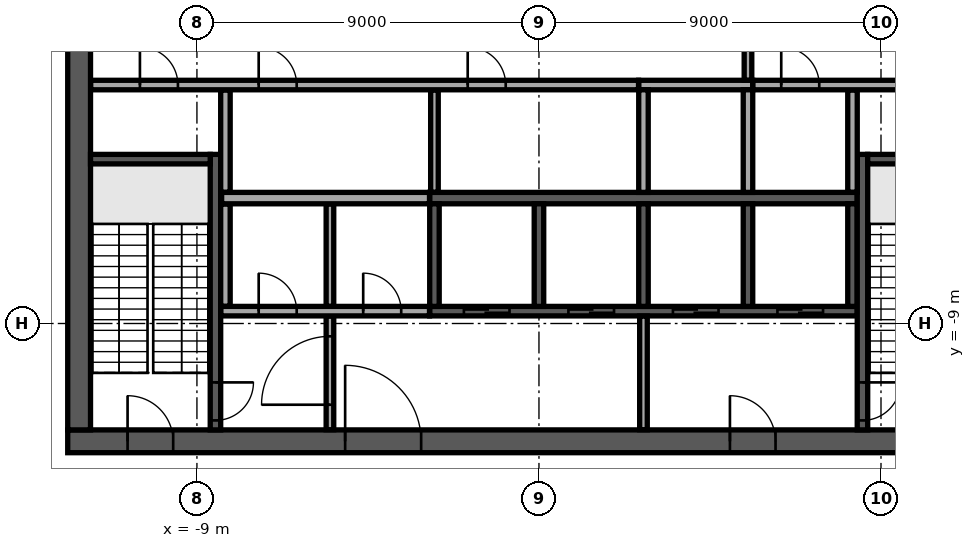
"""IFC4 building model, lengths in metres.
Left out: names, types, materials, properties, quantities, classifications, styles, units other than length and angle.
Written with IfcOpenShell. Run it as: python <this file> out.ifc"""

import sys

from ifc_helpers import new_model, si_unit, direction, frame, frame_2d, origin, place, context, subcontext, project, spatial, rectangle, extrude, element, fill, save


model = new_model("IFC4")
c1 = context("Model", 3, precision=1e-05, world=origin(), true_north=direction((0.0, 1.0)))
c2 = subcontext(c1, "Body", "Model", "MODEL_VIEW")
j1 = project(units=[si_unit("LENGTHUNIT", "METRE"), si_unit("PLANEANGLEUNIT", "RADIAN")], contexts=[c1])
p1 = place(None, origin())
s1 = spatial("IfcSite", under=j1, at=p1, CompositionType="ELEMENT")
p2 = place(p1, origin())
s2 = spatial("IfcBuilding", under=s1, at=p2, CompositionType="ELEMENT")
p3 = place(p2, frame((0.0, 0.0, 344.5)))
s3 = spatial("IfcBuildingStorey", under=s2, at=p3, CompositionType="ELEMENT", Elevation=344.5)
p4 = place(p3, frame((-12.4, -12.1, 0.0), z_axis=(0.0, 0.0, 1.0), x_axis=(1.0, 0.0, 0.0)))
e1 = element("IfcWall", 1, at=p4, inside=s3, PredefinedType="SHEAR", context=c2, shape_type="SweptSolid", body=[
    extrude(rectangle(XDim=24.8, YDim=0.6, at=frame_2d((12.4, 0.0))), origin(), (0.0, 0.0, 1.0), 5.3),
])
p5 = place(p4, frame((7.3, 0.0, 0.0)))
e2 = element("IfcOpeningElement", 2, at=p5, cuts=e1, PredefinedType="OPENING", context=c2, shape_type="SweptSolid", body=[
    extrude(rectangle(XDim=2.0, YDim=2.1, at=frame_2d((1.0, 1.05))), frame((0.0, 0.31, 0.0), z_axis=(0.0, -1.0, 0.0), x_axis=(1.0, 0.0, 0.0)), (0.0, 0.0, 1.0), 0.62),
])
p6 = place(p4, frame((17.425, 0.0, 0.0)))
e3 = element("IfcOpeningElement", 3, at=p6, cuts=e1, PredefinedType="OPENING", context=c2, shape_type="SweptSolid", body=[
    extrude(rectangle(XDim=1.2, YDim=2.1, at=frame_2d((0.6, 1.05))), frame((0.0, 0.31, 0.0), z_axis=(0.0, -1.0, 0.0), x_axis=(1.0, 0.0, 0.0)), (0.0, 0.0, 1.0), 0.62),
])
p7 = place(p4, frame((1.575, 0.0, 0.0)))
e4 = element("IfcOpeningElement", 4, at=p7, cuts=e1, PredefinedType="OPENING", context=c2, shape_type="SweptSolid", body=[
    extrude(rectangle(XDim=1.2, YDim=2.1, at=frame_2d((0.6, 1.05))), frame((0.0, 0.31, 0.0), z_axis=(0.0, -1.0, 0.0), x_axis=(1.0, 0.0, 0.0)), (0.0, 0.0, 1.0), 0.62),
])
p8 = place(p4, frame((22.025, 0.0, 0.0)))
e5 = element("IfcOpeningElement", 5, at=p8, cuts=e1, PredefinedType="OPENING", context=c2, shape_type="SweptSolid", body=[
    extrude(rectangle(XDim=1.2, YDim=2.1, at=frame_2d((0.6, 1.05))), frame((0.0, 0.31, 0.0), z_axis=(0.0, -1.0, 0.0), x_axis=(1.0, 0.0, 0.0)), (0.0, 0.0, 1.0), 0.62),
])
p9 = place(p3, frame((-12.1, -11.8, 0.0), z_axis=(0.0, 0.0, 1.0), x_axis=(0.0, 1.0, 0.0)))
e6 = element("IfcWall", 6, at=p9, inside=s3, PredefinedType="SHEAR", context=c2, shape_type="SweptSolid", body=[
    extrude(rectangle(XDim=23.6, YDim=0.6, at=frame_2d((11.8, 0.0))), origin(), (0.0, 0.0, 1.0), 5.3),
])
p10 = place(p9, frame((10.6, 0.0, 0.0)))
e7 = element("IfcOpeningElement", 7, at=p10, cuts=e6, PredefinedType="OPENING", context=c2, shape_type="SweptSolid", body=[
    extrude(rectangle(XDim=2.4, YDim=2.4, at=frame_2d((1.2, 1.2))), frame((0.0, 0.31, 0.0), z_axis=(0.0, -1.0, 0.0), x_axis=(1.0, 0.0, 0.0)), (0.0, 0.0, 1.0), 0.62),
])
p11 = place(p3, frame((-2.875, -5.7, 0.0), z_axis=(0.0, 0.0, 1.0), x_axis=(1.0, 0.0, 0.0)))
e8 = element("IfcWall", 8, at=p11, inside=s3, PredefinedType="SOLIDWALL", context=c2, shape_type="SweptSolid", body=[
    extrude(rectangle(XDim=11.25, YDim=0.3, at=frame_2d((5.625, 0.0))), origin(), (0.0, 0.0, 1.0), 5.3),
])
p12 = place(p3, frame((2.625, -2.725, 0.0), z_axis=(0.0, 0.0, 1.0), x_axis=(1.0, 0.0, 0.0)))
e9 = element("IfcWall", 9, at=p12, inside=s3, PredefinedType="SOLIDWALL", context=c2, shape_type="SweptSolid", body=[
    extrude(rectangle(XDim=3.0, YDim=0.25, at=frame_2d((1.5, 0.0))), origin(), (0.0, 0.0, 1.0), 5.3),
])
for number, where, z_axis, x_axis in (
    (10, (2.75, -5.55, 0.0), (0.0, 0.0, 1.0), (0.0, 1.0, 0.0)),
    (11, (5.5, -5.55, 0.0), (0.0, 0.0, 1.0), (0.0, 1.0, 0.0)),
):
    element("IfcWall", number, at=place(p3, frame(where, z_axis=z_axis, x_axis=x_axis)), inside=s3, PredefinedType="SOLIDWALL", context=c2, shape_type="SweptSolid", body=[
        extrude(rectangle(XDim=2.7, YDim=0.25, at=frame_2d((1.35, 0.0))), origin(), (0.0, 0.0, 1.0), 5.3),
    ])
p13 = place(p3, frame((-2.875, -8.675, 0.0), z_axis=(0.0, 0.0, 1.0), x_axis=(1.0, 0.0, 0.0)))
e12 = element("IfcWall", 12, at=p13, inside=s3, PredefinedType="SOLIDWALL", context=c2, shape_type="SweptSolid", body=[
    extrude(rectangle(XDim=11.25, YDim=0.25, at=frame_2d((5.625, 0.0))), origin(), (0.0, 0.0, 1.0), 5.3),
])
p14 = place(p13, frame((0.9, 0.0, 0.0)))
e13 = element("IfcOpeningElement", 13, at=p14, cuts=e12, PredefinedType="OPENING", context=c2, shape_type="SweptSolid", body=[
    extrude(rectangle(XDim=1.2, YDim=2.1, at=frame_2d((0.6, 1.05))), frame((0.0, 0.135, 0.0), z_axis=(0.0, -1.0, 0.0), x_axis=(1.0, 0.0, 0.0)), (0.0, 0.0, 1.0), 0.27),
])
p15 = place(p13, frame((3.65, 0.0, 0.0)))
e14 = element("IfcOpeningElement", 14, at=p15, cuts=e12, PredefinedType="OPENING", context=c2, shape_type="SweptSolid", body=[
    extrude(rectangle(XDim=1.2, YDim=2.1, at=frame_2d((0.6, 1.05))), frame((0.0, 0.135, 0.0), z_axis=(0.0, -1.0, 0.0), x_axis=(1.0, 0.0, 0.0)), (0.0, 0.0, 1.0), 0.27),
])
p16 = place(p13, frame((6.4, 0.0, 0.0)))
e15 = element("IfcOpeningElement", 15, at=p16, cuts=e12, PredefinedType="OPENING", context=c2, shape_type="SweptSolid", body=[
    extrude(rectangle(XDim=1.2, YDim=2.1, at=frame_2d((0.6, 1.05))), frame((0.0, 0.135, 0.0), z_axis=(0.0, -1.0, 0.0), x_axis=(1.0, 0.0, 0.0)), (0.0, 0.0, 1.0), 0.27),
])
p17 = place(p13, frame((9.15, 0.0, 0.0)))
e16 = element("IfcOpeningElement", 16, at=p17, cuts=e12, PredefinedType="OPENING", context=c2, shape_type="SweptSolid", body=[
    extrude(rectangle(XDim=1.2, YDim=2.1, at=frame_2d((0.6, 1.05))), frame((0.0, 0.135, 0.0), z_axis=(0.0, -1.0, 0.0), x_axis=(1.0, 0.0, 0.0)), (0.0, 0.0, 1.0), 0.27),
])
for number, where, z_axis, x_axis in (
    (17, (-2.75, -8.55, 0.0), (0.0, 0.0, 1.0), (0.0, 1.0, 0.0)),
    (18, (0.0, -8.55, 0.0), (0.0, 0.0, 1.0), (0.0, 1.0, 0.0)),
    (19, (2.75, -8.55, 0.0), (0.0, 0.0, 1.0), (0.0, 1.0, 0.0)),
    (20, (5.5, -8.55, 0.0), (0.0, 0.0, 1.0), (0.0, 1.0, 0.0)),
    (21, (8.25, -8.55, 0.0), (0.0, 0.0, 1.0), (0.0, 1.0, 0.0)),
):
    element("IfcWall", number, at=place(p3, frame(where, z_axis=z_axis, x_axis=x_axis)), inside=s3, PredefinedType="SOLIDWALL", context=c2, shape_type="SweptSolid", body=[
        extrude(rectangle(XDim=2.7, YDim=0.25, at=frame_2d((1.35, 0.0))), origin(), (0.0, 0.0, 1.0), 5.3),
    ])
p18 = place(p3, frame((-8.512, -4.55, 0.0), z_axis=(0.0, 0.0, 1.0), x_axis=(0.0, -1.0, 0.0)))
e22 = element("IfcWall", 22, at=p18, inside=s3, PredefinedType="SOLIDWALL", context=c2, shape_type="SweptSolid", body=[
    extrude(rectangle(XDim=7.25, YDim=0.275, at=frame_2d((3.625, 0.0))), origin(), (0.0, 0.0, 1.0), 5.3),
])
p19 = place(p18, frame((6.0, 0.0, 0.0)))
e23 = element("IfcOpeningElement", 23, at=p19, cuts=e22, PredefinedType="OPENING", context=c2, shape_type="SweptSolid", body=[
    extrude(rectangle(XDim=1.0, YDim=2.1, at=frame_2d((0.5, 1.05))), frame((0.0, 0.147, 0.0), z_axis=(0.0, -1.0, 0.0), x_axis=(1.0, 0.0, 0.0)), (0.0, 0.0, 1.0), 0.295),
])
p20 = place(p3, frame((-8.65, -4.675, 0.0), z_axis=(0.0, 0.0, 1.0), x_axis=(-1.0, 0.0, 0.0)))
e24 = element("IfcWall", 24, at=p20, inside=s3, PredefinedType="SOLIDWALL", context=c2, shape_type="SweptSolid", body=[
    extrude(rectangle(XDim=3.15, YDim=0.25, at=frame_2d((1.575, 0.0))), origin(), (0.0, 0.0, 1.0), 5.3),
])
p21 = place(p3, frame((8.512, -4.55, 0.0), z_axis=(0.0, 0.0, 1.0), x_axis=(0.0, -1.0, 0.0)))
e25 = element("IfcWall", 25, at=p21, inside=s3, PredefinedType="SOLIDWALL", context=c2, shape_type="SweptSolid", body=[
    extrude(rectangle(XDim=7.25, YDim=0.275, at=frame_2d((3.625, 0.0))), origin(), (0.0, 0.0, 1.0), 5.3),
])
p22 = place(p21, frame((6.0, 0.0, 0.0)))
e26 = element("IfcOpeningElement", 26, at=p22, cuts=e25, PredefinedType="OPENING", context=c2, shape_type="SweptSolid", body=[
    extrude(rectangle(XDim=1.0, YDim=2.1, at=frame_2d((0.5, 1.05))), frame((0.0, 0.147, 0.0), z_axis=(0.0, -1.0, 0.0), x_axis=(1.0, 0.0, 0.0)), (0.0, 0.0, 1.0), 0.295),
])
p23 = place(p3, frame((8.65, -4.675, 0.0), z_axis=(0.0, 0.0, 1.0), x_axis=(1.0, 0.0, 0.0)))
e27 = element("IfcWall", 27, at=p23, inside=s3, PredefinedType="SOLIDWALL", context=c2, shape_type="SweptSolid", body=[
    extrude(rectangle(XDim=3.15, YDim=0.25, at=frame_2d((1.575, 0.0))), origin(), (0.0, 0.0, 1.0), 5.3),
])
p24 = place(p3, frame((-5.5, -11.795, 0.0), z_axis=(0.0, 0.0, 1.0), x_axis=(0.0, 1.0, 0.0)))
e28 = element("IfcWall", 28, at=p24, inside=s3, PredefinedType="PARTITIONING", context=c2, shape_type="SweptSolid", body=[
    extrude(rectangle(XDim=2.99, YDim=0.2, at=frame_2d((1.495, 0.0))), origin(), (0.0, 0.0, 1.0), 5.3),
])
p25 = place(p24, frame((0.657, 0.0, 0.0)))
e29 = element("IfcOpeningElement", 29, at=p25, cuts=e28, PredefinedType="OPENING", context=c2, shape_type="SweptSolid", body=[
    extrude(rectangle(XDim=1.8, YDim=2.1, at=frame_2d((0.9, 1.05))), frame((0.0, 0.11, 0.0), z_axis=(0.0, -1.0, 0.0), x_axis=(1.0, 0.0, 0.0)), (0.0, 0.0, 1.0), 0.22),
])
p26 = place(p3, frame((2.75, -11.795, 0.0), z_axis=(0.0, 0.0, 1.0), x_axis=(0.0, 1.0, 0.0)))
e30 = element("IfcWall", 30, at=p26, inside=s3, PredefinedType="PARTITIONING", context=c2, shape_type="SweptSolid", body=[
    extrude(rectangle(XDim=2.99, YDim=0.2, at=frame_2d((1.495, 0.0))), origin(), (0.0, 0.0, 1.0), 5.3),
])
p27 = place(p3, frame((-8.37, -8.675, 0.0), z_axis=(0.0, 0.0, 1.0), x_axis=(1.0, 0.0, 0.0)))
e31 = element("IfcWall", 31, at=p27, inside=s3, PredefinedType="PARTITIONING", context=c2, shape_type="SweptSolid", body=[
    extrude(rectangle(XDim=5.49, YDim=0.25, at=frame_2d((2.745, 0.0))), origin(), (0.0, 0.0, 1.0), 5.3),
])
p28 = place(p27, frame((0.995, 0.0, 0.0)))
e32 = element("IfcOpeningElement", 32, at=p28, cuts=e31, PredefinedType="OPENING", context=c2, shape_type="SweptSolid", body=[
    extrude(rectangle(XDim=1.0, YDim=2.1, at=frame_2d((0.5, 1.05))), frame((0.0, 0.135, 0.0), z_axis=(0.0, -1.0, 0.0), x_axis=(1.0, 0.0, 0.0)), (0.0, 0.0, 1.0), 0.27),
])
p29 = place(p27, frame((3.745, 0.0, 0.0)))
e33 = element("IfcOpeningElement", 33, at=p29, cuts=e31, PredefinedType="OPENING", context=c2, shape_type="SweptSolid", body=[
    extrude(rectangle(XDim=1.0, YDim=2.1, at=frame_2d((0.5, 1.05))), frame((0.0, 0.135, 0.0), z_axis=(0.0, -1.0, 0.0), x_axis=(1.0, 0.0, 0.0)), (0.0, 0.0, 1.0), 0.27),
])
p30 = place(p3, frame((-8.25, -8.545, 0.0), z_axis=(0.0, 0.0, 1.0), x_axis=(0.0, 1.0, 0.0)))
e34 = element("IfcWall", 34, at=p30, inside=s3, PredefinedType="PARTITIONING", context=c2, shape_type="SweptSolid", body=[
    extrude(rectangle(XDim=2.69, YDim=0.25, at=frame_2d((1.345, 0.0))), origin(), (0.0, 0.0, 1.0), 5.3),
])
p31 = place(p3, frame((-5.5, -8.545, 0.0), z_axis=(0.0, 0.0, 1.0), x_axis=(0.0, 1.0, 0.0)))
e35 = element("IfcWall", 35, at=p31, inside=s3, PredefinedType="PARTITIONING", context=c2, shape_type="SweptSolid", body=[
    extrude(rectangle(XDim=2.69, YDim=0.2, at=frame_2d((1.345, 0.0))), origin(), (0.0, 0.0, 1.0), 5.3),
])
p32 = place(p3, frame((-8.35, -5.7, 0.0), z_axis=(0.0, 0.0, 1.0), x_axis=(1.0, 0.0, 0.0)))
e36 = element("IfcWall", 36, at=p32, inside=s3, PredefinedType="PARTITIONING", context=c2, shape_type="SweptSolid", body=[
    extrude(rectangle(XDim=5.47, YDim=0.3, at=frame_2d((2.735, 0.0))), origin(), (0.0, 0.0, 1.0), 5.3),
])
p33 = place(p3, frame((-8.25, -5.545, 0.0), z_axis=(0.0, 0.0, 1.0), x_axis=(0.0, 1.0, 0.0)))
e37 = element("IfcWall", 37, at=p33, inside=s3, PredefinedType="PARTITIONING", context=c2, shape_type="SweptSolid", body=[
    extrude(rectangle(XDim=2.69, YDim=0.25, at=frame_2d((1.345, 0.0))), origin(), (0.0, 0.0, 1.0), 5.3),
])
p34 = place(p3, frame((-2.75, -5.545, 0.0), z_axis=(0.0, 0.0, 1.0), x_axis=(0.0, 1.0, 0.0)))
e38 = element("IfcWall", 38, at=p34, inside=s3, PredefinedType="PARTITIONING", context=c2, shape_type="SweptSolid", body=[
    extrude(rectangle(XDim=2.69, YDim=0.2, at=frame_2d((1.345, 0.0))), origin(), (0.0, 0.0, 1.0), 5.3),
])
p35 = place(p3, frame((8.25, -5.545, 0.0), z_axis=(0.0, 0.0, 1.0), x_axis=(0.0, 1.0, 0.0)))
e39 = element("IfcWall", 39, at=p35, inside=s3, PredefinedType="PARTITIONING", context=c2, shape_type="SweptSolid", body=[
    extrude(rectangle(XDim=2.69, YDim=0.25, at=frame_2d((1.345, 0.0))), origin(), (0.0, 0.0, 1.0), 5.3),
])
p36 = place(p3, frame((-11.795, -2.725, 0.0), z_axis=(0.0, 0.0, 1.0), x_axis=(1.0, 0.0, 0.0)))
e40 = element("IfcWall", 40, at=p36, inside=s3, PredefinedType="PARTITIONING", context=c2, shape_type="SweptSolid", body=[
    extrude(rectangle(XDim=14.415, YDim=0.25, at=frame_2d((7.208, 0.0))), origin(), (0.0, 0.0, 1.0), 5.3),
])
p37 = place(p36, frame((1.295, 0.0, 0.0)))
e41 = element("IfcOpeningElement", 41, at=p37, cuts=e40, PredefinedType="OPENING", context=c2, shape_type="SweptSolid", body=[
    extrude(rectangle(XDim=1.0, YDim=2.1, at=frame_2d((0.5, 1.05))), frame((0.0, 0.135, 0.0), z_axis=(0.0, -1.0, 0.0), x_axis=(1.0, 0.0, 0.0)), (0.0, 0.0, 1.0), 0.27),
])
p38 = place(p36, frame((4.42, 0.0, 0.0)))
e42 = element("IfcOpeningElement", 42, at=p38, cuts=e40, PredefinedType="OPENING", context=c2, shape_type="SweptSolid", body=[
    extrude(rectangle(XDim=1.0, YDim=2.1, at=frame_2d((0.5, 1.05))), frame((0.0, 0.135, 0.0), z_axis=(0.0, -1.0, 0.0), x_axis=(1.0, 0.0, 0.0)), (0.0, 0.0, 1.0), 0.27),
])
p39 = place(p36, frame((9.92, 0.0, 0.0)))
e43 = element("IfcOpeningElement", 43, at=p39, cuts=e40, PredefinedType="OPENING", context=c2, shape_type="SweptSolid", body=[
    extrude(rectangle(XDim=1.0, YDim=2.1, at=frame_2d((0.5, 1.05))), frame((0.0, 0.135, 0.0), z_axis=(0.0, -1.0, 0.0), x_axis=(1.0, 0.0, 0.0)), (0.0, 0.0, 1.0), 0.27),
])
p40 = place(p3, frame((5.63, -2.725, 0.0), z_axis=(0.0, 0.0, 1.0), x_axis=(1.0, 0.0, 0.0)))
e44 = element("IfcWall", 44, at=p40, inside=s3, PredefinedType="PARTITIONING", context=c2, shape_type="SweptSolid", body=[
    extrude(rectangle(XDim=6.165, YDim=0.25, at=frame_2d((3.083, 0.0))), origin(), (0.0, 0.0, 1.0), 5.3),
])
p41 = place(p40, frame((0.745, 0.0, 0.0)))
e45 = element("IfcOpeningElement", 45, at=p41, cuts=e44, PredefinedType="OPENING", context=c2, shape_type="SweptSolid", body=[
    extrude(rectangle(XDim=1.0, YDim=2.1, at=frame_2d((0.5, 1.05))), frame((0.0, 0.135, 0.0), z_axis=(0.0, -1.0, 0.0), x_axis=(1.0, 0.0, 0.0)), (0.0, 0.0, 1.0), 0.27),
])
p42 = place(p40, frame((3.92, 0.0, 0.0)))
e46 = element("IfcOpeningElement", 46, at=p42, cuts=e44, PredefinedType="OPENING", context=c2, shape_type="SweptSolid", body=[
    extrude(rectangle(XDim=0.9, YDim=2.1, at=frame_2d((0.45, 1.05))), frame((0.0, 0.135, 0.0), z_axis=(0.0, -1.0, 0.0), x_axis=(1.0, 0.0, 0.0)), (0.0, 0.0, 1.0), 0.27),
])
p43 = place(p3, frame((5.5, -2.595, 0.0), z_axis=(0.0, 0.0, 1.0), x_axis=(0.0, 1.0, 0.0)))
e47 = element("IfcWall", 47, at=p43, inside=s3, PredefinedType="PARTITIONING", context=c2, shape_type="SweptSolid", body=[
    extrude(rectangle(XDim=5.19, YDim=0.2, at=frame_2d((2.595, 0.0))), origin(), (0.0, 0.0, 1.0), 5.3),
])
p44 = place(p43, frame((1.395, 0.0, 0.0)))
e48 = element("IfcOpeningElement", 48, at=p44, cuts=e47, PredefinedType="OPENING", context=c2, shape_type="SweptSolid", body=[
    extrude(rectangle(XDim=2.4, YDim=2.4, at=frame_2d((1.2, 1.2))), frame((0.0, 0.11, 0.0), z_axis=(0.0, -1.0, 0.0), x_axis=(1.0, 0.0, 0.0)), (0.0, 0.0, 1.0), 0.22),
])
p45 = place(p5, origin())
e49 = element("IfcDoor", 49, at=p45, inside=s3, OperationType="SINGLE_SWING_LEFT", PredefinedType="DOOR", context=c2, shape_type="SweptSolid", body=[
    extrude(rectangle(XDim=2.0, YDim=2.1, at=frame_2d((1.0, 1.05))), frame((0.0, 0.025, 0.0), z_axis=(0.0, -1.0, 0.0), x_axis=(1.0, 0.0, 0.0)), (0.0, 0.0, 1.0), 0.05),
])
fill(e2, e49)
p46 = place(p6, origin())
e50 = element("IfcDoor", 50, at=p46, inside=s3, OperationType="SINGLE_SWING_LEFT", PredefinedType="DOOR", context=c2, shape_type="SweptSolid", body=[
    extrude(rectangle(XDim=1.2, YDim=2.1, at=frame_2d((0.6, 1.05))), frame((0.0, 0.025, 0.0), z_axis=(0.0, -1.0, 0.0), x_axis=(1.0, 0.0, 0.0)), (0.0, 0.0, 1.0), 0.05),
])
fill(e3, e50)
p47 = place(p7, origin())
e51 = element("IfcDoor", 51, at=p47, inside=s3, OperationType="SINGLE_SWING_LEFT", PredefinedType="DOOR", context=c2, shape_type="SweptSolid", body=[
    extrude(rectangle(XDim=1.2, YDim=2.1, at=frame_2d((0.6, 1.05))), frame((0.0, 0.025, 0.0), z_axis=(0.0, -1.0, 0.0), x_axis=(1.0, 0.0, 0.0)), (0.0, 0.0, 1.0), 0.05),
])
fill(e4, e51)
p48 = place(p14, origin())
e52 = element("IfcDoor", 52, at=p48, inside=s3, OperationType="DOUBLE_DOOR_SLIDING", PredefinedType="DOOR", context=c2, shape_type="SweptSolid", body=[
    extrude(rectangle(XDim=1.2, YDim=2.1, at=frame_2d((0.6, 1.05))), frame((0.0, 0.025, 0.0), z_axis=(0.0, -1.0, 0.0), x_axis=(1.0, 0.0, 0.0)), (0.0, 0.0, 1.0), 0.05),
])
fill(e13, e52)
p49 = place(p15, origin())
e53 = element("IfcDoor", 53, at=p49, inside=s3, OperationType="DOUBLE_DOOR_SLIDING", PredefinedType="DOOR", context=c2, shape_type="SweptSolid", body=[
    extrude(rectangle(XDim=1.2, YDim=2.1, at=frame_2d((0.6, 1.05))), frame((0.0, 0.025, 0.0), z_axis=(0.0, -1.0, 0.0), x_axis=(1.0, 0.0, 0.0)), (0.0, 0.0, 1.0), 0.05),
])
fill(e14, e53)
p50 = place(p16, origin())
e54 = element("IfcDoor", 54, at=p50, inside=s3, OperationType="DOUBLE_DOOR_SLIDING", PredefinedType="DOOR", context=c2, shape_type="SweptSolid", body=[
    extrude(rectangle(XDim=1.2, YDim=2.1, at=frame_2d((0.6, 1.05))), frame((0.0, 0.025, 0.0), z_axis=(0.0, -1.0, 0.0), x_axis=(1.0, 0.0, 0.0)), (0.0, 0.0, 1.0), 0.05),
])
fill(e15, e54)
p51 = place(p17, origin())
e55 = element("IfcDoor", 55, at=p51, inside=s3, OperationType="DOUBLE_DOOR_SLIDING", PredefinedType="DOOR", context=c2, shape_type="SweptSolid", body=[
    extrude(rectangle(XDim=1.2, YDim=2.1, at=frame_2d((0.6, 1.05))), frame((0.0, 0.025, 0.0), z_axis=(0.0, -1.0, 0.0), x_axis=(1.0, 0.0, 0.0)), (0.0, 0.0, 1.0), 0.05),
])
fill(e16, e55)
p52 = place(p19, origin())
e56 = element("IfcDoor", 56, at=p52, inside=s3, OperationType="SINGLE_SWING_LEFT", PredefinedType="DOOR", context=c2, shape_type="SweptSolid", body=[
    extrude(rectangle(XDim=1.0, YDim=2.1, at=frame_2d((0.5, 1.05))), frame((0.0, 0.025, 0.0), z_axis=(0.0, -1.0, 0.0), x_axis=(1.0, 0.0, 0.0)), (0.0, 0.0, 1.0), 0.05),
])
fill(e23, e56)
p53 = place(p22, origin())
e57 = element("IfcDoor", 57, at=p53, inside=s3, OperationType="SINGLE_SWING_LEFT", PredefinedType="DOOR", context=c2, shape_type="SweptSolid", body=[
    extrude(rectangle(XDim=1.0, YDim=2.1, at=frame_2d((0.5, 1.05))), frame((0.0, 0.025, 0.0), z_axis=(0.0, -1.0, 0.0), x_axis=(1.0, 0.0, 0.0)), (0.0, 0.0, 1.0), 0.05),
])
fill(e26, e57)
p54 = place(p28, origin())
e58 = element("IfcDoor", 58, at=p54, inside=s3, OperationType="SINGLE_SWING_LEFT", PredefinedType="DOOR", context=c2, shape_type="SweptSolid", body=[
    extrude(rectangle(XDim=1.0, YDim=2.1, at=frame_2d((0.5, 1.05))), frame((0.0, 0.025, 0.0), z_axis=(0.0, -1.0, 0.0), x_axis=(1.0, 0.0, 0.0)), (0.0, 0.0, 1.0), 0.05),
])
fill(e32, e58)
p55 = place(p29, origin())
e59 = element("IfcDoor", 59, at=p55, inside=s3, OperationType="SINGLE_SWING_LEFT", PredefinedType="DOOR", context=c2, shape_type="SweptSolid", body=[
    extrude(rectangle(XDim=1.0, YDim=2.1, at=frame_2d((0.5, 1.05))), frame((0.0, 0.025, 0.0), z_axis=(0.0, -1.0, 0.0), x_axis=(1.0, 0.0, 0.0)), (0.0, 0.0, 1.0), 0.05),
])
fill(e33, e59)
p56 = place(p37, origin())
e60 = element("IfcDoor", 60, at=p56, inside=s3, OperationType="SINGLE_SWING_LEFT", PredefinedType="DOOR", context=c2, shape_type="SweptSolid", body=[
    extrude(rectangle(XDim=1.0, YDim=2.1, at=frame_2d((0.5, 1.05))), frame((0.0, 0.025, 0.0), z_axis=(0.0, -1.0, 0.0), x_axis=(1.0, 0.0, 0.0)), (0.0, 0.0, 1.0), 0.05),
])
fill(e41, e60)
p57 = place(p41, origin())
e61 = element("IfcDoor", 61, at=p57, inside=s3, OperationType="SINGLE_SWING_LEFT", PredefinedType="DOOR", context=c2, shape_type="SweptSolid", body=[
    extrude(rectangle(XDim=1.0, YDim=2.1, at=frame_2d((0.5, 1.05))), frame((0.0, 0.025, 0.0), z_axis=(0.0, -1.0, 0.0), x_axis=(1.0, 0.0, 0.0)), (0.0, 0.0, 1.0), 0.05),
])
fill(e45, e61)
p58 = place(p38, origin())
e62 = element("IfcDoor", 62, at=p58, inside=s3, OperationType="SINGLE_SWING_LEFT", PredefinedType="DOOR", context=c2, shape_type="SweptSolid", body=[
    extrude(rectangle(XDim=1.0, YDim=2.1, at=frame_2d((0.5, 1.05))), frame((0.0, 0.025, 0.0), z_axis=(0.0, -1.0, 0.0), x_axis=(1.0, 0.0, 0.0)), (0.0, 0.0, 1.0), 0.05),
])
fill(e42, e62)
p59 = place(p39, origin())
e63 = element("IfcDoor", 63, at=p59, inside=s3, OperationType="SINGLE_SWING_LEFT", PredefinedType="DOOR", context=c2, shape_type="SweptSolid", body=[
    extrude(rectangle(XDim=1.0, YDim=2.1, at=frame_2d((0.5, 1.05))), frame((0.0, 0.025, 0.0), z_axis=(0.0, -1.0, 0.0), x_axis=(1.0, 0.0, 0.0)), (0.0, 0.0, 1.0), 0.05),
])
fill(e43, e63)
p60 = place(p25, origin())
e64 = element("IfcDoor", 64, at=p60, inside=s3, OperationType="SINGLE_SWING_LEFT", PredefinedType="DOOR", context=c2, shape_type="SweptSolid", body=[
    extrude(rectangle(XDim=1.8, YDim=2.1, at=frame_2d((0.9, 1.05))), frame((0.0, 0.025, 0.0), z_axis=(0.0, -1.0, 0.0), x_axis=(1.0, 0.0, 0.0)), (0.0, 0.0, 1.0), 0.05),
])
fill(e29, e64)
save(model, sys.argv[1])
